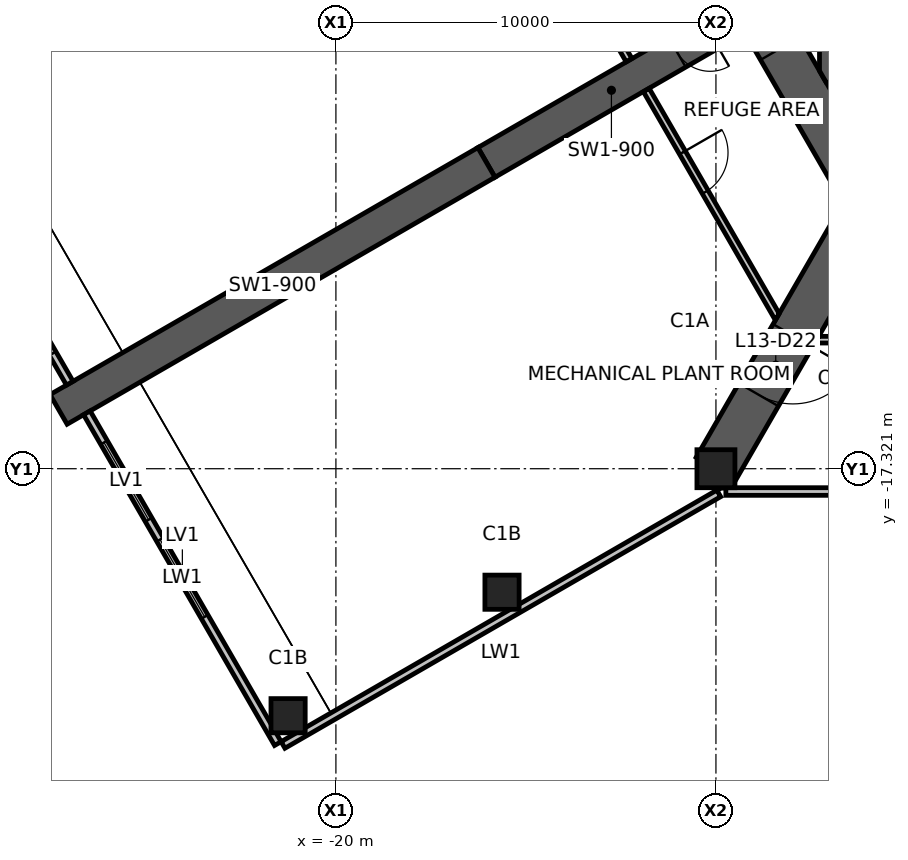
"""IFC4 building model, lengths in metres.
Left out: names, types, materials, properties, quantities, classifications, styles, units other than length and angle.
Written with IfcOpenShell. Run it as: python <this file> out.ifc"""

import sys

from ifc_helpers import new_model, si_unit, direction, frame, frame_2d, origin, origin_2d, place, context, subcontext, project, spatial, polyline, rectangle, hollow_rectangle, outline, extrude, element, fill, save


model = new_model("IFC4")
c1 = context("Model", 3, precision=1e-05, world=origin(), true_north=direction((0.0, 1.0)))
c2 = subcontext(c1, "Body", "Model", "MODEL_VIEW")
j1 = project(units=[si_unit("LENGTHUNIT", "METRE"), si_unit("PLANEANGLEUNIT", "RADIAN")], contexts=[c1])
p1 = place(None, origin())
s1 = spatial("IfcSite", under=j1, at=p1, CompositionType="ELEMENT")
p2 = place(p1, origin())
s2 = spatial("IfcBuilding", under=s1, at=p2, CompositionType="ELEMENT")
p3 = place(p2, frame((0.0, 0.0, 52.0)))
s3 = spatial("IfcBuildingStorey", under=s2, at=p3, CompositionType="ELEMENT", Elevation=52.0)
p4 = place(p3, frame((-10.0, -17.321, 0.0), z_axis=(0.0, 0.0, 1.0), x_axis=(1.0, 0.0, 0.0)))
e1 = element("IfcColumn", 1, at=p4, inside=s3, PredefinedType="COLUMN", context=c2, shape_type="SweptSolid", body=[
    extrude(hollow_rectangle(XDim=1.0, YDim=1.0, WallThickness=0.06, at=origin_2d()), origin(), (0.0, 0.0, 1.0), 5.0),
])
for number, where, z_axis, x_axis in (
    (2, (-15.629, -20.571, 0.0), (0.0, 0.0, 1.0), (1.0, 0.0, 0.0)),
    (3, (-21.258, -23.821, 0.0), (0.0, 0.0, 1.0), (1.0, 0.0, 0.0)),
):
    element("IfcColumn", number, at=place(p3, frame(where, z_axis=z_axis, x_axis=x_axis)), inside=s3, PredefinedType="COLUMN", context=c2, shape_type="SweptSolid", body=[
        extrude(hollow_rectangle(XDim=0.9, YDim=0.9, WallThickness=0.05, at=origin_2d()), origin(), (0.0, 0.0, 1.0), 5.0),
    ])
p5 = place(p3, frame((-11.922, 0.0, 0.0), z_axis=(0.0, 0.0, 1.0), x_axis=(0.500004296715, -0.866022923061, 0.0)))
e4 = element("IfcWall", 4, at=p5, inside=s3, PredefinedType="SHEAR", context=c2, shape_type="SweptSolid", body=[
    extrude(outline(polyline([(-0.346, -0.6), (6.431, -0.6), (7.231, -0.6), (12.269, -0.6), (11.576, 0.6), (7.231, 0.6), (6.431, 0.6), (0.346, 0.6), (-0.346, -0.6)])), origin(), (0.0, 0.0, 1.0), 5.0),
])
p6 = place(p5, frame((6.431, 0.0, 0.0)))
e5 = element("IfcOpeningElement", 5, at=p6, cuts=e4, PredefinedType="OPENING", context=c2, shape_type="SweptSolid", body=[
    extrude(rectangle(XDim=0.8, YDim=2.1, at=frame_2d((0.4, 1.05))), frame((0.0, 0.61, 0.0), z_axis=(0.0, -1.0, 0.0), x_axis=(1.0, 0.0, 0.0)), (0.0, 0.0, 1.0), 1.22),
])
p7 = place(p3, frame((-9.461, -5.462, 0.0), z_axis=(0.0, 0.0, 1.0), x_axis=(-0.866019116917, -0.500010889016, 0.0)))
e6 = element("IfcWall", 6, at=p7, inside=s3, PredefinedType="SHEAR", context=c2, shape_type="SweptSolid", body=[
    extrude(rectangle(XDim=7.595, YDim=0.9, at=frame_2d((3.798, 0.0))), origin(), (0.0, 0.0, 1.0), 5.0),
])
p8 = place(p7, frame((0.8, 0.0, 0.0)))
e7 = element("IfcOpeningElement", 7, at=p8, cuts=e6, PredefinedType="OPENING", context=c2, shape_type="SweptSolid", body=[
    extrude(rectangle(XDim=1.0, YDim=2.1, at=frame_2d((0.5, 1.05))), frame((0.0, 0.46, 0.0), z_axis=(0.0, -1.0, 0.0), x_axis=(1.0, 0.0, 0.0)), (0.0, 0.0, 1.0), 0.92),
])
p9 = place(p3, frame((-16.039, -9.26, 0.0), z_axis=(0.0, 0.0, 1.0), x_axis=(-0.866024837091, -0.50000098154, 0.0)))
e8 = element("IfcWall", 8, at=p9, inside=s3, PredefinedType="SHEAR", context=c2, shape_type="SweptSolid", body=[
    extrude(rectangle(XDim=13.0, YDim=0.9, at=frame_2d((6.5, 0.0))), origin(), (0.0, 0.0, 1.0), 5.0),
])
p10 = place(p3, frame((-6.308, -10.925, -1.15), z_axis=(0.0, 0.0, 1.0), x_axis=(-0.499993363642, -0.866029235253, 0.0)))
e9 = element("IfcWall", 9, at=p10, inside=s3, PredefinedType="SHEAR", context=c2, shape_type="SweptSolid", body=[
    extrude(outline(polyline([(-0.346, -0.6), (3.338, -0.6), (5.138, -0.6), (7.385, -0.6), (7.385, 0.6), (5.138, 0.6), (3.338, 0.6), (-0.346, 0.6), (0.0, 0.0), (-0.346, -0.6)])), origin(), (0.0, 0.0, 1.0), 6.15),
])
p11 = place(p10, frame((3.338, 0.0, 1.15)))
e10 = element("IfcOpeningElement", 10, at=p11, cuts=e9, PredefinedType="OPENING", context=c2, shape_type="SweptSolid", body=[
    extrude(rectangle(XDim=1.8, YDim=2.4, at=frame_2d((0.9, 1.2))), frame((0.0, 0.61, 0.0), z_axis=(0.0, -1.0, 0.0), x_axis=(1.0, 0.0, 0.0)), (0.0, 0.0, 1.0), 1.22),
])
p12 = place(p3, frame((-21.391, -24.59, 0.0), z_axis=(0.0, 0.0, 1.0), x_axis=(0.86602620781, 0.499998607384, 0.0)))
e11 = element("IfcWall", 11, at=p12, inside=s3, PredefinedType="ELEMENTEDWALL", context=c2, shape_type="SweptSolid", body=[
    extrude(rectangle(XDim=13.239, YDim=0.2, at=frame_2d((6.62, 0.0))), origin(), (0.0, 0.0, 1.0), 5.0),
])
p13 = place(p3, frame((-9.739, -17.92, 0.0), z_axis=(0.0, 0.0, 1.0), x_axis=(1.0, 0.0, 0.0)))
e12 = element("IfcWall", 12, at=p13, inside=s3, PredefinedType="ELEMENTEDWALL", context=c2, shape_type="SweptSolid", body=[
    extrude(rectangle(XDim=19.479, YDim=0.2, at=frame_2d((9.739, 0.0))), origin(), (0.0, 0.0, 1.0), 5.0),
])
p14 = place(p3, frame((-32.028, -6.367, 0.0), z_axis=(0.0, 0.0, 1.0), x_axis=(0.499990214365, -0.86603105345, 0.0)))
e13 = element("IfcWall", 13, at=p14, inside=s3, PredefinedType="ELEMENTEDWALL", context=c2, shape_type="SweptSolid", body=[
    extrude(rectangle(XDim=10.05, YDim=0.2, at=frame_2d((5.025, 0.0))), origin(), (0.0, 0.0, 1.0), 5.0),
])
p15 = place(p14, frame((3.85, 0.0, 0.6)))
e14 = element("IfcOpeningElement", 14, at=p15, cuts=e13, PredefinedType="OPENING", context=c2, shape_type="SweptSolid", body=[
    extrude(rectangle(XDim=2.35, YDim=3.6, at=frame_2d((1.175, 1.8))), frame((0.0, 0.11, 0.0), z_axis=(0.0, -1.0, 0.0), x_axis=(1.0, 0.0, 0.0)), (0.0, 0.0, 1.0), 0.22),
])
p16 = place(p14, frame((6.8, 0.0, 0.6)))
e15 = element("IfcOpeningElement", 15, at=p16, cuts=e13, PredefinedType="OPENING", context=c2, shape_type="SweptSolid", body=[
    extrude(rectangle(XDim=2.35, YDim=3.6, at=frame_2d((1.175, 1.8))), frame((0.0, 0.11, 0.0), z_axis=(0.0, -1.0, 0.0), x_axis=(1.0, 0.0, 0.0)), (0.0, 0.0, 1.0), 0.22),
])
p17 = place(p3, frame((-26.553, -15.85, 0.0), z_axis=(0.0, 0.0, 1.0), x_axis=(0.500008433718, -0.866020534521, 0.0)))
e16 = element("IfcWall", 16, at=p17, inside=s3, PredefinedType="ELEMENTEDWALL", context=c2, shape_type="SweptSolid", body=[
    extrude(rectangle(XDim=10.05, YDim=0.2, at=frame_2d((5.025, 0.0))), origin(), (0.0, 0.0, 1.0), 5.0),
])
p18 = place(p17, frame((0.9, 0.0, 0.6)))
e17 = element("IfcOpeningElement", 17, at=p18, cuts=e16, PredefinedType="OPENING", context=c2, shape_type="SweptSolid", body=[
    extrude(rectangle(XDim=2.35, YDim=3.6, at=frame_2d((1.175, 1.8))), frame((0.0, 0.11, 0.0), z_axis=(0.0, -1.0, 0.0), x_axis=(1.0, 0.0, 0.0)), (0.0, 0.0, 1.0), 0.22),
])
p19 = place(p17, frame((3.85, 0.0, 0.6)))
e18 = element("IfcOpeningElement", 18, at=p19, cuts=e16, PredefinedType="OPENING", context=c2, shape_type="SweptSolid", body=[
    extrude(rectangle(XDim=2.35, YDim=3.6, at=frame_2d((1.175, 1.8))), frame((0.0, 0.11, 0.0), z_axis=(0.0, -1.0, 0.0), x_axis=(1.0, 0.0, 0.0)), (0.0, 0.0, 1.0), 0.22),
])
p20 = place(p3, frame((-7.1, -3.775, 0.0), z_axis=(0.0, 0.0, 1.0), x_axis=(0.0, -1.0, 0.0)))
e19 = element("IfcWall", 19, at=p20, inside=s3, PredefinedType="SHEAR", context=c2, shape_type="SweptSolid", body=[
    extrude(outline(polyline([(0.0, -0.175), (3.074, -0.175), (3.377, 0.0), (3.4, 0.175), (0.0, 0.175), (0.0, -0.175)])), origin(), (0.0, 0.0, 1.0), 5.0),
])
p21 = place(p3, frame((-15.733, -0.6, 0.0), z_axis=(0.0, 0.0, 1.0), x_axis=(0.500013761451, -0.866017458461, 0.0)))
e20 = element("IfcWall", 20, at=p21, inside=s3, PredefinedType="PARTITIONING", context=c2, shape_type="SweptSolid", body=[
    extrude(outline(polyline([(-0.051, -0.087), (6.892, -0.087), (6.892, 0.087), (0.051, 0.087), (-0.051, -0.087)])), origin(), (0.0, 0.0, 1.0), 4.83),
])
p22 = place(p3, frame((-11.832, -7.356, 0.0), z_axis=(0.0, 0.0, 1.0), x_axis=(0.49998719302, -0.866032797772, 0.0)))
e21 = element("IfcWall", 21, at=p22, inside=s3, PredefinedType="PARTITIONING", context=c2, shape_type="SweptSolid", body=[
    extrude(outline(polyline([(0.0, -0.087), (1.9, -0.087), (3.1, -0.087), (6.942, -0.087), (6.841, 0.087), (3.1, 0.087), (1.9, 0.087), (0.0, 0.087), (0.0, -0.087)])), origin(), (0.0, 0.0, 1.0), 4.83),
])
p23 = place(p22, frame((1.9, 0.0, 0.0)))
e22 = element("IfcOpeningElement", 22, at=p23, cuts=e21, PredefinedType="OPENING", context=c2, shape_type="SweptSolid", body=[
    extrude(rectangle(XDim=1.2, YDim=2.1, at=frame_2d((0.6, 1.05))), frame((0.0, 0.098, 0.0), z_axis=(0.0, -1.0, 0.0), x_axis=(1.0, 0.0, 0.0)), (0.0, 0.0, 1.0), 0.195),
])
p24 = place(p3, frame((-7.347, -13.925, 0.0), z_axis=(0.0, 0.0, 1.0), x_axis=(1.0, 0.0, 0.0)))
e23 = element("IfcWall", 23, at=p24, inside=s3, PredefinedType="PARTITIONING", context=c2, shape_type="SweptSolid", body=[
    extrude(outline(polyline([(-0.051, -0.087), (1.213, -0.087), (2.413, -0.087), (14.744, -0.087), (14.643, 0.087), (2.413, 0.087), (1.213, 0.087), (0.051, 0.087), (-0.051, -0.087)])), origin(), (0.0, 0.0, 1.0), 4.83),
])
p25 = place(p24, frame((1.213, 0.0, 0.0)))
e24 = element("IfcOpeningElement", 24, at=p25, cuts=e23, PredefinedType="OPENING", context=c2, shape_type="SweptSolid", body=[
    extrude(rectangle(XDim=1.2, YDim=2.1, at=frame_2d((0.6, 1.05))), frame((0.0, 0.098, 0.0), z_axis=(0.0, -1.0, 0.0), x_axis=(1.0, 0.0, 0.0)), (0.0, 0.0, 1.0), 0.195),
])
p26 = place(p16, origin())
e25 = element("IfcWindow", 25, at=p26, inside=s3, PartitioningType="SINGLE_PANEL", PredefinedType="USERDEFINED", context=c2, shape_type="SweptSolid", body=[
    extrude(rectangle(XDim=2.35, YDim=3.6, at=frame_2d((1.175, 1.8))), frame((0.0, 0.03, 0.0), z_axis=(0.0, -1.0, 0.0), x_axis=(1.0, 0.0, 0.0)), (0.0, 0.0, 1.0), 0.06),
])
fill(e15, e25)
p27 = place(p18, origin())
e26 = element("IfcWindow", 26, at=p27, inside=s3, PartitioningType="SINGLE_PANEL", PredefinedType="USERDEFINED", context=c2, shape_type="SweptSolid", body=[
    extrude(rectangle(XDim=2.35, YDim=3.6, at=frame_2d((1.175, 1.8))), frame((0.0, 0.03, 0.0), z_axis=(0.0, -1.0, 0.0), x_axis=(1.0, 0.0, 0.0)), (0.0, 0.0, 1.0), 0.06),
])
fill(e17, e26)
p28 = place(p19, origin())
e27 = element("IfcWindow", 27, at=p28, inside=s3, PartitioningType="SINGLE_PANEL", PredefinedType="USERDEFINED", context=c2, shape_type="SweptSolid", body=[
    extrude(rectangle(XDim=2.35, YDim=3.6, at=frame_2d((1.175, 1.8))), frame((0.0, 0.03, 0.0), z_axis=(0.0, -1.0, 0.0), x_axis=(1.0, 0.0, 0.0)), (0.0, 0.0, 1.0), 0.06),
])
fill(e18, e27)
p29 = place(p8, origin())
e28 = element("IfcDoor", 28, at=p29, inside=s3, OperationType="SINGLE_SWING_LEFT", PredefinedType="DOOR", context=c2, shape_type="SweptSolid", body=[
    extrude(rectangle(XDim=1.0, YDim=2.1, at=frame_2d((0.5, 1.05))), frame((0.0, 0.025, 0.0), z_axis=(0.0, -1.0, 0.0), x_axis=(1.0, 0.0, 0.0)), (0.0, 0.0, 1.0), 0.05),
])
fill(e7, e28)
p30 = place(p11, origin())
e29 = element("IfcDoor", 29, at=p30, inside=s3, OperationType="DOUBLE_DOOR_SINGLE_SWING", PredefinedType="DOOR", context=c2, shape_type="SweptSolid", body=[
    extrude(rectangle(XDim=1.8, YDim=2.4, at=frame_2d((0.9, 1.2))), frame((0.0, 0.025, 0.0), z_axis=(0.0, -1.0, 0.0), x_axis=(1.0, 0.0, 0.0)), (0.0, 0.0, 1.0), 0.05),
])
fill(e10, e29)
p31 = place(p23, origin())
e30 = element("IfcDoor", 30, at=p31, inside=s3, OperationType="DOUBLE_DOOR_SINGLE_SWING", PredefinedType="DOOR", context=c2, shape_type="SweptSolid", body=[
    extrude(rectangle(XDim=1.2, YDim=2.1, at=frame_2d((0.6, 1.05))), frame((0.0, 0.025, 0.0), z_axis=(0.0, -1.0, 0.0), x_axis=(1.0, 0.0, 0.0)), (0.0, 0.0, 1.0), 0.05),
])
fill(e22, e30)
save(model, sys.argv[1])
